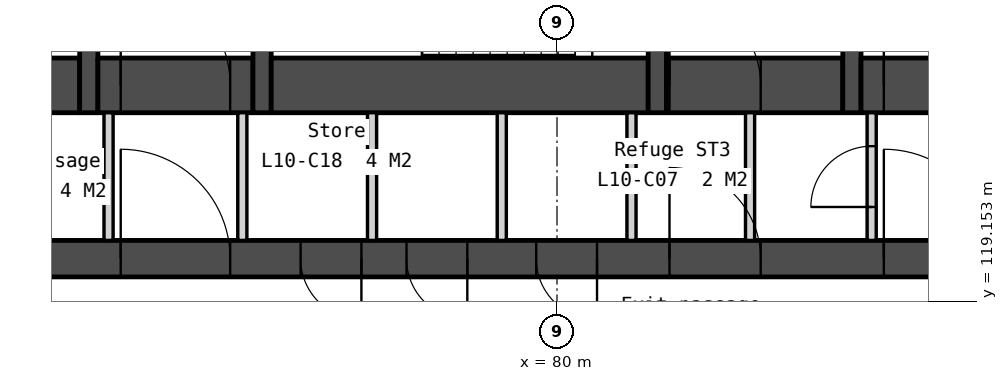
"""IFC4 building model, lengths in metres.
Left out: names, types, materials, properties, quantities, classifications, styles, units other than length and angle.
Written with IfcOpenShell. Run it as: python <this file> out.ifc"""

import sys

from ifc_helpers import new_model, si_unit, direction, frame, frame_2d, origin, place, context, subcontext, project, spatial, polyline, rectangle, outline, extrude, element, fill, save


model = new_model("IFC4")
c1 = context("Model", 3, precision=1e-05, world=origin(), true_north=direction((0.0, 1.0)))
c2 = subcontext(c1, "Body", "Model", "MODEL_VIEW")
j1 = project(units=[si_unit("LENGTHUNIT", "METRE"), si_unit("PLANEANGLEUNIT", "RADIAN")], contexts=[c1])
p1 = place(None, origin())
s1 = spatial("IfcSite", under=j1, at=p1, CompositionType="ELEMENT")
p2 = place(p1, origin())
s2 = spatial("IfcBuilding", under=s1, at=p2, CompositionType="ELEMENT")
p3 = place(p2, frame((0.0, 0.0, 49.0)))
s3 = spatial("IfcBuildingStorey", under=s2, at=p3, CompositionType="ELEMENT", Elevation=49.0)
p4 = place(p3, frame((66.0, 119.85, 0.0), z_axis=(0.0, 0.0, 1.0), x_axis=(1.0, 0.0, 0.0)))
e1 = element("IfcWall", 1, at=p4, inside=s3, PredefinedType="SOLIDWALL", context=c2, shape_type="SweptSolid", body=[
    extrude(rectangle(XDim=28.0, YDim=0.6, at=frame_2d((14.0, 0.0))), origin(), (0.0, 0.0, 1.0), 3.35),
])
p5 = place(p4, frame((6.825, 0.0, 0.0)))
e2 = element("IfcOpeningElement", 2, at=p5, cuts=e1, PredefinedType="OPENING", context=c2, shape_type="SweptSolid", body=[
    extrude(rectangle(XDim=1.8, YDim=2.1, at=frame_2d((0.9, 1.05))), frame((0.0, 0.31, 0.0), z_axis=(0.0, -1.0, 0.0), x_axis=(1.0, 0.0, 0.0)), (0.0, 0.0, 1.0), 0.62),
])
p6 = place(p4, frame((15.85, 0.0, 0.0)))
e3 = element("IfcOpeningElement", 3, at=p6, cuts=e1, PredefinedType="OPENING", context=c2, shape_type="SweptSolid", body=[
    extrude(rectangle(XDim=1.5, YDim=2.1, at=frame_2d((0.75, 1.05))), frame((0.0, 0.31, 0.0), z_axis=(0.0, -1.0, 0.0), x_axis=(1.0, 0.0, 0.0)), (0.0, 0.0, 1.0), 0.62),
])
p7 = place(p4, frame((19.375, 0.0, 0.0)))
e4 = element("IfcOpeningElement", 4, at=p7, cuts=e1, PredefinedType="OPENING", context=c2, shape_type="SweptSolid", body=[
    extrude(rectangle(XDim=1.8, YDim=2.1, at=frame_2d((0.9, 1.05))), frame((0.0, 0.31, 0.0), z_axis=(0.0, -1.0, 0.0), x_axis=(1.0, 0.0, 0.0)), (0.0, 0.0, 1.0), 0.62),
])
p8 = place(p4, frame((4.425, 0.0, 0.0)))
e5 = element("IfcOpeningElement", 5, at=p8, cuts=e1, PredefinedType="OPENING", context=c2, shape_type="SweptSolid", body=[
    extrude(rectangle(XDim=1.0, YDim=2.1, at=frame_2d((0.5, 1.05))), frame((0.0, 0.31, 0.0), z_axis=(0.0, -1.0, 0.0), x_axis=(1.0, 0.0, 0.0)), (0.0, 0.0, 1.0), 0.62),
])
p9 = place(p4, frame((9.783, 0.0, 0.0)))
e6 = element("IfcOpeningElement", 6, at=p9, cuts=e1, PredefinedType="OPENING", context=c2, shape_type="SweptSolid", body=[
    extrude(rectangle(XDim=1.0, YDim=2.1, at=frame_2d((0.5, 1.05))), frame((0.0, 0.31, 0.0), z_axis=(0.0, -1.0, 0.0), x_axis=(1.0, 0.0, 0.0)), (0.0, 0.0, 1.0), 0.62),
])
p10 = place(p4, frame((11.525, 0.0, 0.0)))
e7 = element("IfcOpeningElement", 7, at=p10, cuts=e1, PredefinedType="OPENING", context=c2, shape_type="SweptSolid", body=[
    extrude(rectangle(XDim=1.0, YDim=2.1, at=frame_2d((0.5, 1.05))), frame((0.0, 0.31, 0.0), z_axis=(0.0, -1.0, 0.0), x_axis=(1.0, 0.0, 0.0)), (0.0, 0.0, 1.0), 0.62),
])
p11 = place(p4, frame((13.658, 0.0, 0.0)))
e8 = element("IfcOpeningElement", 8, at=p11, cuts=e1, PredefinedType="OPENING", context=c2, shape_type="SweptSolid", body=[
    extrude(rectangle(XDim=1.0, YDim=2.1, at=frame_2d((0.5, 1.05))), frame((0.0, 0.31, 0.0), z_axis=(0.0, -1.0, 0.0), x_axis=(1.0, 0.0, 0.0)), (0.0, 0.0, 1.0), 0.62),
])
p12 = place(p4, frame((21.725, 0.0, 0.0)))
e9 = element("IfcOpeningElement", 9, at=p12, cuts=e1, PredefinedType="OPENING", context=c2, shape_type="SweptSolid", body=[
    extrude(rectangle(XDim=1.0, YDim=2.1, at=frame_2d((0.5, 1.05))), frame((0.0, 0.31, 0.0), z_axis=(0.0, -1.0, 0.0), x_axis=(1.0, 0.0, 0.0)), (0.0, 0.0, 1.0), 0.62),
])
p13 = place(p4, frame((23.425, 0.0, 0.0)))
e10 = element("IfcOpeningElement", 10, at=p13, cuts=e1, PredefinedType="OPENING", context=c2, shape_type="SweptSolid", body=[
    extrude(rectangle(XDim=1.0, YDim=2.1, at=frame_2d((0.5, 1.05))), frame((0.0, 0.31, 0.0), z_axis=(0.0, -1.0, 0.0), x_axis=(1.0, 0.0, 0.0)), (0.0, 0.0, 1.0), 0.62),
])
p14 = place(p3, frame((69.6, 122.7, 0.0), z_axis=(0.0, 0.0, 1.0), x_axis=(1.0, 0.0, 0.0)))
e11 = element("IfcWall", 11, at=p14, inside=s3, PredefinedType="SOLIDWALL", context=c2, shape_type="SweptSolid", body=[
    extrude(rectangle(XDim=2.55, YDim=0.9, at=frame_2d((1.275, 0.0))), origin(), (0.0, 0.0, 1.0), 3.35),
])
p15 = place(p3, frame((72.3, 133.95, 0.0), z_axis=(0.0, 0.0, 1.0), x_axis=(0.0, -1.0, 0.0)))
e12 = element("IfcWall", 12, at=p15, inside=s3, PredefinedType="SOLIDWALL", context=c2, shape_type="SweptSolid", body=[
    extrude(rectangle(XDim=11.7, YDim=0.3, at=frame_2d((5.85, 0.0))), origin(), (0.0, 0.0, 1.0), 3.35),
])
p16 = place(p15, frame((6.95, 0.0, 0.0)))
e13 = element("IfcOpeningElement", 13, at=p16, cuts=e12, PredefinedType="OPENING", context=c2, shape_type="SweptSolid", body=[
    extrude(rectangle(XDim=1.1, YDim=2.1, at=frame_2d((0.55, 1.05))), frame((0.0, 0.16, 0.0), z_axis=(0.0, -1.0, 0.0), x_axis=(1.0, 0.0, 0.0)), (0.0, 0.0, 1.0), 0.32),
])
p17 = place(p15, frame((9.35, 0.0, 0.0)))
e14 = element("IfcOpeningElement", 14, at=p17, cuts=e12, PredefinedType="OPENING", context=c2, shape_type="SweptSolid", body=[
    extrude(rectangle(XDim=0.9, YDim=2.1, at=frame_2d((0.45, 1.05))), frame((0.0, 0.16, 0.0), z_axis=(0.0, -1.0, 0.0), x_axis=(1.0, 0.0, 0.0)), (0.0, 0.0, 1.0), 0.32),
])
p18 = place(p15, frame((5.1, 0.0, 0.0)))
e15 = element("IfcOpeningElement", 15, at=p18, cuts=e12, PredefinedType="OPENING", context=c2, shape_type="SweptSolid", body=[
    extrude(rectangle(XDim=1.0, YDim=2.1, at=frame_2d((0.5, 1.05))), frame((0.0, 0.16, 0.0), z_axis=(0.0, -1.0, 0.0), x_axis=(1.0, 0.0, 0.0)), (0.0, 0.0, 1.0), 0.32),
])
p19 = place(p3, frame((72.45, 122.7, 0.0), z_axis=(0.0, 0.0, 1.0), x_axis=(1.0, 0.0, 0.0)))
e16 = element("IfcWall", 16, at=p19, inside=s3, PredefinedType="SOLIDWALL", context=c2, shape_type="SweptSolid", body=[
    extrude(rectangle(XDim=2.55, YDim=0.9, at=frame_2d((1.275, 0.0))), origin(), (0.0, 0.0, 1.0), 3.35),
])
p20 = place(p19, frame((0.375, 0.0, 0.0)))
e17 = element("IfcOpeningElement", 17, at=p20, cuts=e16, PredefinedType="OPENING", context=c2, shape_type="SweptSolid", body=[
    extrude(rectangle(XDim=1.8, YDim=2.1, at=frame_2d((0.9, 1.05))), frame((0.0, 0.46, 0.0), z_axis=(0.0, -1.0, 0.0), x_axis=(1.0, 0.0, 0.0)), (0.0, 0.0, 1.0), 0.92),
])
for number, where, z_axis, x_axis in (
    (18, (72.625, 122.25, 0.0), (0.0, 0.0, 1.0), (0.0, -1.0, 0.0)),
    (19, (74.825, 122.25, 0.0), (0.0, 0.0, 1.0), (0.0, -1.0, 0.0)),
):
    element("IfcWall", number, at=place(p3, frame(where, z_axis=z_axis, x_axis=x_axis)), inside=s3, PredefinedType="PARTITIONING", context=c2, shape_type="SweptSolid", body=[
        extrude(rectangle(XDim=2.1, YDim=0.15, at=frame_2d((1.05, 0.0))), origin(), (0.0, 0.0, 1.0), 3.35),
    ])
p21 = place(p3, frame((75.15, 133.95, 0.0), z_axis=(0.0, 0.0, 1.0), x_axis=(0.0, -1.0, 0.0)))
e20 = element("IfcWall", 20, at=p21, inside=s3, PredefinedType="SOLIDWALL", context=c2, shape_type="SweptSolid", body=[
    extrude(rectangle(XDim=11.7, YDim=0.3, at=frame_2d((5.85, 0.0))), origin(), (0.0, 0.0, 1.0), 3.35),
])
p22 = place(p3, frame((75.3, 122.7, 0.0), z_axis=(0.0, 0.0, 1.0), x_axis=(1.0, 0.0, 0.0)))
e21 = element("IfcWall", 21, at=p22, inside=s3, PredefinedType="SOLIDWALL", context=c2, shape_type="SweptSolid", body=[
    extrude(rectangle(XDim=6.2, YDim=0.9, at=frame_2d((3.1, 0.0))), origin(), (0.0, 0.0, 1.0), 3.35),
])
for number, where, z_axis, x_axis in (
    (22, (76.958, 122.25, 0.0), (0.0, 0.0, 1.0), (0.0, -1.0, 0.0)),
    (23, (79.092, 122.25, 0.0), (0.0, 0.0, 1.0), (0.0, -1.0, 0.0)),
    (24, (81.225, 122.25, 0.0), (0.0, 0.0, 1.0), (0.0, -1.0, 0.0)),
):
    element("IfcWall", number, at=place(p3, frame(where, z_axis=z_axis, x_axis=x_axis)), inside=s3, PredefinedType="PARTITIONING", context=c2, shape_type="SweptSolid", body=[
        extrude(rectangle(XDim=2.1, YDim=0.15, at=frame_2d((1.05, 0.0))), origin(), (0.0, 0.0, 1.0), 3.35),
    ])
p23 = place(p3, frame((81.65, 125.7, 0.0), z_axis=(0.0, 0.0, 1.0), x_axis=(0.0, -1.0, 0.0)))
e25 = element("IfcWall", 25, at=p23, inside=s3, PredefinedType="SOLIDWALL", context=c2, shape_type="SweptSolid", body=[
    extrude(rectangle(XDim=3.45, YDim=0.3, at=frame_2d((1.725, 0.0))), origin(), (0.0, 0.0, 1.0), 3.35),
])
p24 = place(p23, frame((0.75, 0.0, 0.0)))
e26 = element("IfcOpeningElement", 26, at=p24, cuts=e25, PredefinedType="OPENING", context=c2, shape_type="SweptSolid", body=[
    extrude(rectangle(XDim=1.0, YDim=2.1, at=frame_2d((0.5, 1.05))), frame((0.0, 0.16, 0.0), z_axis=(0.0, -1.0, 0.0), x_axis=(1.0, 0.0, 0.0)), (0.0, 0.0, 1.0), 0.32),
])
p25 = place(p3, frame((81.8, 122.7, 0.0), z_axis=(0.0, 0.0, 1.0), x_axis=(1.0, 0.0, 0.0)))
e27 = element("IfcWall", 27, at=p25, inside=s3, PredefinedType="SOLIDWALL", context=c2, shape_type="SweptSolid", body=[
    extrude(rectangle(XDim=2.9, YDim=0.9, at=frame_2d((1.45, 0.0))), origin(), (0.0, 0.0, 1.0), 3.35),
])
p26 = place(p25, frame((0.05, 0.0, 0.0)))
e28 = element("IfcOpeningElement", 28, at=p26, cuts=e27, PredefinedType="OPENING", context=c2, shape_type="SweptSolid", body=[
    extrude(rectangle(XDim=1.5, YDim=2.1, at=frame_2d((0.75, 1.05))), frame((0.0, 0.46, 0.0), z_axis=(0.0, -1.0, 0.0), x_axis=(1.0, 0.0, 0.0)), (0.0, 0.0, 1.0), 0.92),
])
p27 = place(p3, frame((83.175, 122.25, 0.0), z_axis=(0.0, 0.0, 1.0), x_axis=(0.0, -1.0, 0.0)))
e29 = element("IfcWall", 29, at=p27, inside=s3, PredefinedType="PARTITIONING", context=c2, shape_type="SweptSolid", body=[
    extrude(rectangle(XDim=2.1, YDim=0.15, at=frame_2d((1.05, 0.0))), origin(), (0.0, 0.0, 1.0), 3.35),
])
p28 = place(p3, frame((84.85, 133.95, 0.0), z_axis=(0.0, 0.0, 1.0), x_axis=(0.0, -1.0, 0.0)))
e30 = element("IfcWall", 30, at=p28, inside=s3, PredefinedType="SOLIDWALL", context=c2, shape_type="SweptSolid", body=[
    extrude(rectangle(XDim=11.7, YDim=0.3, at=frame_2d((5.85, 0.0))), origin(), (0.0, 0.0, 1.0), 3.35),
])
p29 = place(p3, frame((85.0, 122.7, 0.0), z_axis=(0.0, 0.0, 1.0), x_axis=(1.0, 0.0, 0.0)))
e31 = element("IfcWall", 31, at=p29, inside=s3, PredefinedType="SOLIDWALL", context=c2, shape_type="SweptSolid", body=[
    extrude(rectangle(XDim=2.55, YDim=0.9, at=frame_2d((1.275, 0.0))), origin(), (0.0, 0.0, 1.0), 3.35),
])
p30 = place(p29, frame((0.375, 0.0, 0.0)))
e32 = element("IfcOpeningElement", 32, at=p30, cuts=e31, PredefinedType="OPENING", context=c2, shape_type="SweptSolid", body=[
    extrude(rectangle(XDim=1.8, YDim=2.1, at=frame_2d((0.9, 1.05))), frame((0.0, 0.46, 0.0), z_axis=(0.0, -1.0, 0.0), x_axis=(1.0, 0.0, 0.0)), (0.0, 0.0, 1.0), 0.92),
])
p31 = place(p3, frame((85.175, 122.25, 0.0), z_axis=(0.0, 0.0, 1.0), x_axis=(0.0, -1.0, 0.0)))
e33 = element("IfcWall", 33, at=p31, inside=s3, PredefinedType="PARTITIONING", context=c2, shape_type="SweptSolid", body=[
    extrude(rectangle(XDim=2.1, YDim=0.15, at=frame_2d((1.05, 0.0))), origin(), (0.0, 0.0, 1.0), 3.35),
])
p32 = place(p31, frame((0.55, 0.0, 0.0)))
e34 = element("IfcOpeningElement", 34, at=p32, cuts=e33, PredefinedType="OPENING", context=c2, shape_type="SweptSolid", body=[
    extrude(rectangle(XDim=1.0, YDim=2.1, at=frame_2d((0.5, 1.05))), frame((0.0, 0.085, 0.0), z_axis=(0.0, -1.0, 0.0), x_axis=(1.0, 0.0, 0.0)), (0.0, 0.0, 1.0), 0.17),
])
p33 = place(p3, frame((54.495, 129.397, -0.15), z_axis=(0.0, 0.0, 1.0), x_axis=(0.499999201451, -0.866025864826, 0.0)))
e35 = element("IfcWall", 35, at=p33, inside=s3, PredefinedType="SOLIDWALL", context=c2, shape_type="SweptSolid", body=[
    extrude(outline(polyline([(44.8, 0.0), (44.8, 3.5), (0.0, 3.5), (0.0, 0.0), (44.8, 0.0)])), frame((0.0, 0.225, 0.0), z_axis=(0.0, -1.0, 0.0), x_axis=(1.0, 0.0, 0.0)), (0.0, 0.0, 1.0), 0.45),
])
p34 = place(p33, frame((2.43, 0.0, 1.05)))
e36 = element("IfcOpeningElement", 36, at=p34, cuts=e35, PredefinedType="OPENING", context=c2, shape_type="SweptSolid", body=[
    extrude(rectangle(XDim=1.8, YDim=1.5, at=frame_2d((0.9, 0.75))), frame((0.0, 0.235, 0.0), z_axis=(0.0, -1.0, 0.0), x_axis=(1.0, 0.0, 0.0)), (0.0, 0.0, 1.0), 0.47),
])
p35 = place(p33, frame((4.73, 0.0, 1.05)))
e37 = element("IfcOpeningElement", 37, at=p35, cuts=e35, PredefinedType="OPENING", context=c2, shape_type="SweptSolid", body=[
    extrude(rectangle(XDim=1.8, YDim=1.5, at=frame_2d((0.9, 0.75))), frame((0.0, 0.235, 0.0), z_axis=(0.0, -1.0, 0.0), x_axis=(1.0, 0.0, 0.0)), (0.0, 0.0, 1.0), 0.47),
])
p36 = place(p33, frame((11.39, 0.0, 1.05)))
e38 = element("IfcOpeningElement", 38, at=p36, cuts=e35, PredefinedType="OPENING", context=c2, shape_type="SweptSolid", body=[
    extrude(rectangle(XDim=1.8, YDim=1.5, at=frame_2d((0.9, 0.75))), frame((0.0, 0.235, 0.0), z_axis=(0.0, -1.0, 0.0), x_axis=(1.0, 0.0, 0.0)), (0.0, 0.0, 1.0), 0.47),
])
p37 = place(p33, frame((13.69, 0.0, 1.05)))
e39 = element("IfcOpeningElement", 39, at=p37, cuts=e35, PredefinedType="OPENING", context=c2, shape_type="SweptSolid", body=[
    extrude(rectangle(XDim=1.8, YDim=1.5, at=frame_2d((0.9, 0.75))), frame((0.0, 0.235, 0.0), z_axis=(0.0, -1.0, 0.0), x_axis=(1.0, 0.0, 0.0)), (0.0, 0.0, 1.0), 0.47),
])
p38 = place(p33, frame((20.35, 0.0, 1.05)))
e40 = element("IfcOpeningElement", 40, at=p38, cuts=e35, PredefinedType="OPENING", context=c2, shape_type="SweptSolid", body=[
    extrude(rectangle(XDim=1.8, YDim=1.5, at=frame_2d((0.9, 0.75))), frame((0.0, 0.235, 0.0), z_axis=(0.0, -1.0, 0.0), x_axis=(1.0, 0.0, 0.0)), (0.0, 0.0, 1.0), 0.47),
])
p39 = place(p33, frame((22.65, 0.0, 1.05)))
e41 = element("IfcOpeningElement", 41, at=p39, cuts=e35, PredefinedType="OPENING", context=c2, shape_type="SweptSolid", body=[
    extrude(rectangle(XDim=1.8, YDim=1.5, at=frame_2d((0.9, 0.75))), frame((0.0, 0.235, 0.0), z_axis=(0.0, -1.0, 0.0), x_axis=(1.0, 0.0, 0.0)), (0.0, 0.0, 1.0), 0.47),
])
p40 = place(p33, frame((29.31, 0.0, 1.05)))
e42 = element("IfcOpeningElement", 42, at=p40, cuts=e35, PredefinedType="OPENING", context=c2, shape_type="SweptSolid", body=[
    extrude(rectangle(XDim=1.8, YDim=1.5, at=frame_2d((0.9, 0.75))), frame((0.0, 0.235, 0.0), z_axis=(0.0, -1.0, 0.0), x_axis=(1.0, 0.0, 0.0)), (0.0, 0.0, 1.0), 0.47),
])
p41 = place(p33, frame((31.61, 0.0, 1.05)))
e43 = element("IfcOpeningElement", 43, at=p41, cuts=e35, PredefinedType="OPENING", context=c2, shape_type="SweptSolid", body=[
    extrude(rectangle(XDim=1.8, YDim=1.5, at=frame_2d((0.9, 0.75))), frame((0.0, 0.235, 0.0), z_axis=(0.0, -1.0, 0.0), x_axis=(1.0, 0.0, 0.0)), (0.0, 0.0, 1.0), 0.47),
])
p42 = place(p33, frame((38.27, 0.0, 1.05)))
e44 = element("IfcOpeningElement", 44, at=p42, cuts=e35, PredefinedType="OPENING", context=c2, shape_type="SweptSolid", body=[
    extrude(rectangle(XDim=1.8, YDim=1.5, at=frame_2d((0.9, 0.75))), frame((0.0, 0.235, 0.0), z_axis=(0.0, -1.0, 0.0), x_axis=(1.0, 0.0, 0.0)), (0.0, 0.0, 1.0), 0.47),
])
p43 = place(p33, frame((40.57, 0.0, 1.05)))
e45 = element("IfcOpeningElement", 45, at=p43, cuts=e35, PredefinedType="OPENING", context=c2, shape_type="SweptSolid", body=[
    extrude(rectangle(XDim=1.8, YDim=1.5, at=frame_2d((0.9, 0.75))), frame((0.0, 0.235, 0.0), z_axis=(0.0, -1.0, 0.0), x_axis=(1.0, 0.0, 0.0)), (0.0, 0.0, 1.0), 0.47),
])
p44 = place(p3, frame((83.105, 90.599, -0.15), z_axis=(0.0, 0.0, 1.0), x_axis=(0.499999201451, 0.866025864826, 0.0)))
e46 = element("IfcWall", 46, at=p44, inside=s3, PredefinedType="SOLIDWALL", context=c2, shape_type="SweptSolid", body=[
    extrude(outline(polyline([(44.8, 0.0), (44.8, 3.5), (0.0, 3.5), (0.0, 0.0), (44.8, 0.0)])), frame((0.0, 0.225, 0.0), z_axis=(0.0, -1.0, 0.0), x_axis=(1.0, 0.0, 0.0)), (0.0, 0.0, 1.0), 0.45),
])
p45 = place(p44, frame((2.43, 0.0, 1.05)))
e47 = element("IfcOpeningElement", 47, at=p45, cuts=e46, PredefinedType="OPENING", context=c2, shape_type="SweptSolid", body=[
    extrude(rectangle(XDim=1.8, YDim=1.5, at=frame_2d((0.9, 0.75))), frame((0.0, 0.235, 0.0), z_axis=(0.0, -1.0, 0.0), x_axis=(1.0, 0.0, 0.0)), (0.0, 0.0, 1.0), 0.47),
])
p46 = place(p44, frame((4.73, 0.0, 1.05)))
e48 = element("IfcOpeningElement", 48, at=p46, cuts=e46, PredefinedType="OPENING", context=c2, shape_type="SweptSolid", body=[
    extrude(rectangle(XDim=1.8, YDim=1.5, at=frame_2d((0.9, 0.75))), frame((0.0, 0.235, 0.0), z_axis=(0.0, -1.0, 0.0), x_axis=(1.0, 0.0, 0.0)), (0.0, 0.0, 1.0), 0.47),
])
p47 = place(p44, frame((11.39, 0.0, 1.05)))
e49 = element("IfcOpeningElement", 49, at=p47, cuts=e46, PredefinedType="OPENING", context=c2, shape_type="SweptSolid", body=[
    extrude(rectangle(XDim=1.8, YDim=1.5, at=frame_2d((0.9, 0.75))), frame((0.0, 0.235, 0.0), z_axis=(0.0, -1.0, 0.0), x_axis=(1.0, 0.0, 0.0)), (0.0, 0.0, 1.0), 0.47),
])
p48 = place(p44, frame((13.69, 0.0, 1.05)))
e50 = element("IfcOpeningElement", 50, at=p48, cuts=e46, PredefinedType="OPENING", context=c2, shape_type="SweptSolid", body=[
    extrude(rectangle(XDim=1.8, YDim=1.5, at=frame_2d((0.9, 0.75))), frame((0.0, 0.235, 0.0), z_axis=(0.0, -1.0, 0.0), x_axis=(1.0, 0.0, 0.0)), (0.0, 0.0, 1.0), 0.47),
])
p49 = place(p44, frame((20.35, 0.0, 1.05)))
e51 = element("IfcOpeningElement", 51, at=p49, cuts=e46, PredefinedType="OPENING", context=c2, shape_type="SweptSolid", body=[
    extrude(rectangle(XDim=1.8, YDim=1.5, at=frame_2d((0.9, 0.75))), frame((0.0, 0.235, 0.0), z_axis=(0.0, -1.0, 0.0), x_axis=(1.0, 0.0, 0.0)), (0.0, 0.0, 1.0), 0.47),
])
p50 = place(p44, frame((22.65, 0.0, 1.05)))
e52 = element("IfcOpeningElement", 52, at=p50, cuts=e46, PredefinedType="OPENING", context=c2, shape_type="SweptSolid", body=[
    extrude(rectangle(XDim=1.8, YDim=1.5, at=frame_2d((0.9, 0.75))), frame((0.0, 0.235, 0.0), z_axis=(0.0, -1.0, 0.0), x_axis=(1.0, 0.0, 0.0)), (0.0, 0.0, 1.0), 0.47),
])
p51 = place(p44, frame((29.31, 0.0, 1.05)))
e53 = element("IfcOpeningElement", 53, at=p51, cuts=e46, PredefinedType="OPENING", context=c2, shape_type="SweptSolid", body=[
    extrude(rectangle(XDim=1.8, YDim=1.5, at=frame_2d((0.9, 0.75))), frame((0.0, 0.235, 0.0), z_axis=(0.0, -1.0, 0.0), x_axis=(1.0, 0.0, 0.0)), (0.0, 0.0, 1.0), 0.47),
])
p52 = place(p44, frame((31.61, 0.0, 1.05)))
e54 = element("IfcOpeningElement", 54, at=p52, cuts=e46, PredefinedType="OPENING", context=c2, shape_type="SweptSolid", body=[
    extrude(rectangle(XDim=1.8, YDim=1.5, at=frame_2d((0.9, 0.75))), frame((0.0, 0.235, 0.0), z_axis=(0.0, -1.0, 0.0), x_axis=(1.0, 0.0, 0.0)), (0.0, 0.0, 1.0), 0.47),
])
p53 = place(p44, frame((38.27, 0.0, 1.05)))
e55 = element("IfcOpeningElement", 55, at=p53, cuts=e46, PredefinedType="OPENING", context=c2, shape_type="SweptSolid", body=[
    extrude(rectangle(XDim=1.8, YDim=1.5, at=frame_2d((0.9, 0.75))), frame((0.0, 0.235, 0.0), z_axis=(0.0, -1.0, 0.0), x_axis=(1.0, 0.0, 0.0)), (0.0, 0.0, 1.0), 0.47),
])
p54 = place(p44, frame((40.57, 0.0, 1.05)))
e56 = element("IfcOpeningElement", 56, at=p54, cuts=e46, PredefinedType="OPENING", context=c2, shape_type="SweptSolid", body=[
    extrude(rectangle(XDim=1.8, YDim=1.5, at=frame_2d((0.9, 0.75))), frame((0.0, 0.235, 0.0), z_axis=(0.0, -1.0, 0.0), x_axis=(1.0, 0.0, 0.0)), (0.0, 0.0, 1.0), 0.47),
])
p55 = place(p30, origin())
e57 = element("IfcDoor", 57, at=p55, inside=s3, OperationType="DOUBLE_DOOR_DOUBLE_SWING", PredefinedType="DOOR", context=c2, shape_type="SweptSolid", body=[
    extrude(rectangle(XDim=1.8, YDim=2.1, at=frame_2d((0.9, 1.05))), frame((0.0, 0.025, 0.0), z_axis=(0.0, -1.0, 0.0), x_axis=(1.0, 0.0, 0.0)), (0.0, 0.0, 1.0), 0.05),
])
fill(e32, e57)
p56 = place(p20, origin())
e58 = element("IfcDoor", 58, at=p56, inside=s3, OperationType="DOUBLE_DOOR_DOUBLE_SWING", PredefinedType="DOOR", context=c2, shape_type="SweptSolid", body=[
    extrude(rectangle(XDim=1.8, YDim=2.1, at=frame_2d((0.9, 1.05))), frame((0.0, 0.025, 0.0), z_axis=(0.0, -1.0, 0.0), x_axis=(1.0, 0.0, 0.0)), (0.0, 0.0, 1.0), 0.05),
])
fill(e17, e58)
p57 = place(p26, origin())
e59 = element("IfcDoor", 59, at=p57, inside=s3, OperationType="DOUBLE_DOOR_DOUBLE_SWING", PredefinedType="DOOR", context=c2, shape_type="SweptSolid", body=[
    extrude(rectangle(XDim=1.5, YDim=2.1, at=frame_2d((0.75, 1.05))), frame((0.0, 0.025, 0.0), z_axis=(0.0, -1.0, 0.0), x_axis=(1.0, 0.0, 0.0)), (0.0, 0.0, 1.0), 0.05),
])
fill(e28, e59)
p58 = place(p5, origin())
e60 = element("IfcDoor", 60, at=p58, inside=s3, OperationType="DOUBLE_DOOR_DOUBLE_SWING", PredefinedType="DOOR", context=c2, shape_type="SweptSolid", body=[
    extrude(rectangle(XDim=1.8, YDim=2.1, at=frame_2d((0.9, 1.05))), frame((0.0, 0.025, 0.0), z_axis=(0.0, -1.0, 0.0), x_axis=(1.0, 0.0, 0.0)), (0.0, 0.0, 1.0), 0.05),
])
fill(e2, e60)
p59 = place(p6, origin())
e61 = element("IfcDoor", 61, at=p59, inside=s3, OperationType="DOUBLE_DOOR_DOUBLE_SWING", PredefinedType="DOOR", context=c2, shape_type="SweptSolid", body=[
    extrude(rectangle(XDim=1.5, YDim=2.1, at=frame_2d((0.75, 1.05))), frame((0.0, 0.025, 0.0), z_axis=(0.0, -1.0, 0.0), x_axis=(1.0, 0.0, 0.0)), (0.0, 0.0, 1.0), 0.05),
])
fill(e3, e61)
p60 = place(p7, origin())
e62 = element("IfcDoor", 62, at=p60, inside=s3, OperationType="DOUBLE_DOOR_DOUBLE_SWING", PredefinedType="DOOR", context=c2, shape_type="SweptSolid", body=[
    extrude(rectangle(XDim=1.8, YDim=2.1, at=frame_2d((0.9, 1.05))), frame((0.0, 0.025, 0.0), z_axis=(0.0, -1.0, 0.0), x_axis=(1.0, 0.0, 0.0)), (0.0, 0.0, 1.0), 0.05),
])
fill(e4, e62)
p61 = place(p9, origin())
e63 = element("IfcDoor", 63, at=p61, inside=s3, OperationType="SINGLE_SWING_RIGHT", PredefinedType="DOOR", context=c2, shape_type="SweptSolid", body=[
    extrude(rectangle(XDim=1.0, YDim=2.1, at=frame_2d((0.5, 1.05))), frame((0.0, 0.025, 0.0), z_axis=(0.0, -1.0, 0.0), x_axis=(1.0, 0.0, 0.0)), (0.0, 0.0, 1.0), 0.05),
])
fill(e6, e63)
p62 = place(p10, origin())
e64 = element("IfcDoor", 64, at=p62, inside=s3, OperationType="SINGLE_SWING_RIGHT", PredefinedType="DOOR", context=c2, shape_type="SweptSolid", body=[
    extrude(rectangle(XDim=1.0, YDim=2.1, at=frame_2d((0.5, 1.05))), frame((0.0, 0.025, 0.0), z_axis=(0.0, -1.0, 0.0), x_axis=(1.0, 0.0, 0.0)), (0.0, 0.0, 1.0), 0.05),
])
fill(e7, e64)
p63 = place(p11, origin())
e65 = element("IfcDoor", 65, at=p63, inside=s3, OperationType="SINGLE_SWING_RIGHT", PredefinedType="DOOR", context=c2, shape_type="SweptSolid", body=[
    extrude(rectangle(XDim=1.0, YDim=2.1, at=frame_2d((0.5, 1.05))), frame((0.0, 0.025, 0.0), z_axis=(0.0, -1.0, 0.0), x_axis=(1.0, 0.0, 0.0)), (0.0, 0.0, 1.0), 0.05),
])
fill(e8, e65)
p64 = place(p32, origin())
e66 = element("IfcDoor", 66, at=p64, inside=s3, OperationType="SINGLE_SWING_RIGHT", PredefinedType="DOOR", context=c2, shape_type="SweptSolid", body=[
    extrude(rectangle(XDim=1.0, YDim=2.1, at=frame_2d((0.5, 1.05))), frame((0.0, 0.025, 0.0), z_axis=(0.0, -1.0, 0.0), x_axis=(1.0, 0.0, 0.0)), (0.0, 0.0, 1.0), 0.05),
])
fill(e34, e66)
save(model, sys.argv[1])
